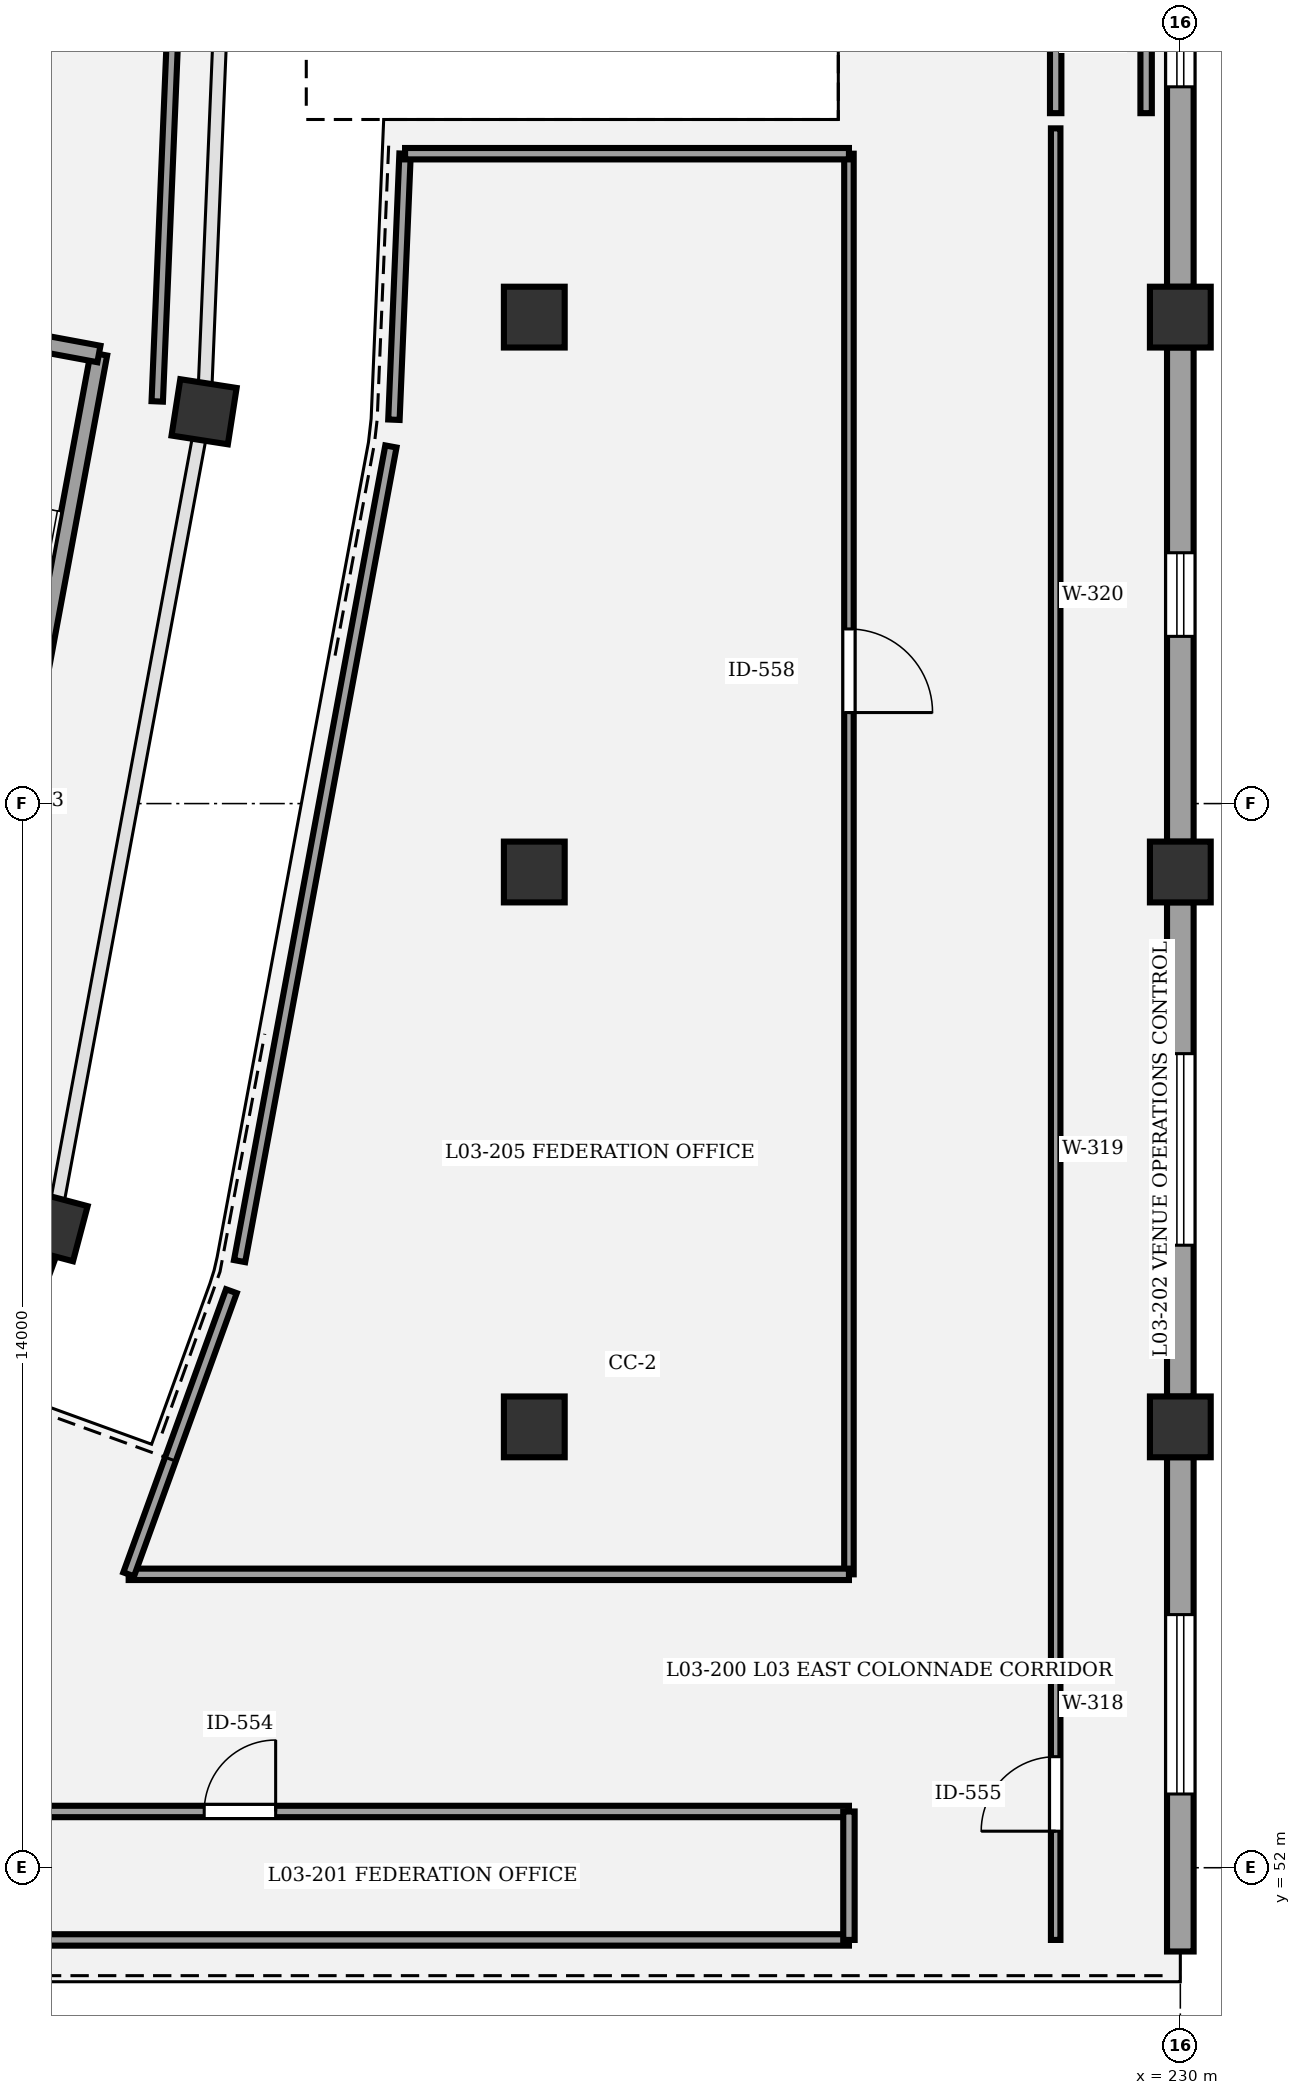
"""IFC4 building model, lengths in metres.
Left out: names, types, materials, properties, quantities, classifications, styles, units other than length and angle.
Written with IfcOpenShell. Run it as: python <this file> out.ifc"""

import sys

from ifc_helpers import new_model, si_unit, direction, frame, frame_2d, origin, origin_2d, place, context, subcontext, project, spatial, rectangle, circle, extrude, element, fill, save


model = new_model("IFC4")
c1 = context("Model", 3, precision=1e-05, world=origin(), true_north=direction((0.0, 1.0)))
c2 = subcontext(c1, "Body", "Model", "MODEL_VIEW")
j1 = project(units=[si_unit("LENGTHUNIT", "METRE"), si_unit("PLANEANGLEUNIT", "RADIAN")], contexts=[c1])
p1 = place(None, origin())
s1 = spatial("IfcSite", under=j1, at=p1, CompositionType="ELEMENT")
p2 = place(p1, origin())
s2 = spatial("IfcBuilding", under=s1, at=p2, CompositionType="ELEMENT")
p3 = place(p2, frame((0.0, 0.0, 14.7)))
s3 = spatial("IfcBuildingStorey", under=s2, at=p3, CompositionType="ELEMENT", Elevation=14.7)
for number, where, z_axis, x_axis in (
    (1, (215.165, 60.438, 0.0), (0.0, 0.0, 1.0), (0.967, -0.256, 0.0)),
    (2, (217.156, 71.155, 0.0), (0.0, 0.0, 1.0), (0.988, -0.153, 0.0)),
):
    element("IfcColumn", number, at=place(p3, frame(where, z_axis=z_axis, x_axis=x_axis)), inside=s3, PredefinedType="COLUMN", context=c2, shape_type="SweptSolid", body=[
        extrude(rectangle(XDim=0.75, YDim=0.75, at=origin_2d()), origin(), (0.0, 0.0, 1.0), 4.5),
    ])
for number, where, z_axis, x_axis in (
    (3, (221.5, 57.8, 0.0), (0.0, 0.0, 1.0), (1.0, 0.0, 0.0)),
    (4, (221.5, 65.1, 0.0), (0.0, 0.0, 1.0), (1.0, 0.0, 0.0)),
    (5, (221.5, 72.4, 0.0), (0.0, 0.0, 1.0), (1.0, 0.0, 0.0)),
    (6, (230.0, 57.8, 0.0), (0.0, 0.0, 1.0), (1.0, 0.0, 0.0)),
    (7, (230.0, 65.1, 0.0), (0.0, 0.0, 1.0), (1.0, 0.0, 0.0)),
    (8, (230.0, 72.4, 0.0), (0.0, 0.0, 1.0), (1.0, 0.0, 0.0)),
):
    element("IfcColumn", number, at=place(p3, frame(where, z_axis=z_axis, x_axis=x_axis)), inside=s3, PredefinedType="COLUMN", context=c2, shape_type="SweptSolid", body=[
        extrude(circle(Radius=0.4, at=origin_2d()), origin(), (0.0, 0.0, 1.0), 4.5),
    ])
p4 = place(p3, frame((215.037, 60.087, 0.0), z_axis=(0.0, 0.0, 1.0), x_axis=(-0.341014063491, -0.94005819421, 0.0)))
e9 = element("IfcWall", 9, at=p4, inside=s3, PredefinedType="STANDARD", context=c2, shape_type="SweptSolid", body=[
    extrude(rectangle(XDim=8.956, YDim=0.35, at=frame_2d((4.478, 0.0))), origin(), (0.0, 0.0, 1.0), 3.42),
])
p5 = place(p4, frame((3.578, 0.0, 0.0)))
e10 = element("IfcOpeningElement", 10, at=p5, cuts=e9, PredefinedType="OPENING", context=c2, shape_type="SweptSolid", body=[
    extrude(rectangle(XDim=1.8, YDim=2.4, at=frame_2d((0.9, 1.2))), frame((0.0, 0.185, 0.0), z_axis=(0.0, -1.0, 0.0), x_axis=(1.0, 0.0, 0.0)), (0.0, 0.0, 1.0), 0.37),
])
p6 = place(p3, frame((230.0, 57.402, 0.0), z_axis=(0.0, 0.0, 1.0), x_axis=(0.0, -1.0, 0.0)))
e11 = element("IfcWall", 11, at=p6, inside=s3, PredefinedType="STANDARD", context=c2, shape_type="SweptSolid", body=[
    extrude(rectangle(XDim=6.504, YDim=0.35, at=frame_2d((3.252, 0.0))), origin(), (0.0, 0.0, 1.0), 3.26),
])
p7 = place(p6, frame((2.072, 0.0, 0.9)))
e12 = element("IfcOpeningElement", 12, at=p7, cuts=e11, PredefinedType="OPENING", context=c2, shape_type="SweptSolid", body=[
    extrude(rectangle(XDim=2.36, YDim=1.55, at=frame_2d((1.18, 0.775))), frame((0.0, 0.185, 0.0), z_axis=(0.0, -1.0, 0.0), x_axis=(1.0, 0.0, 0.0)), (0.0, 0.0, 1.0), 0.37),
])
p8 = place(p3, frame((230.0, 64.702, 0.0), z_axis=(0.0, 0.0, 1.0), x_axis=(0.0, -1.0, 0.0)))
e13 = element("IfcWall", 13, at=p8, inside=s3, PredefinedType="STANDARD", context=c2, shape_type="SweptSolid", body=[
    extrude(rectangle(XDim=6.504, YDim=0.35, at=frame_2d((3.252, 0.0))), origin(), (0.0, 0.0, 1.0), 3.26),
])
p9 = place(p8, frame((1.992, 0.0, 0.9)))
e14 = element("IfcOpeningElement", 14, at=p9, cuts=e13, PredefinedType="OPENING", context=c2, shape_type="SweptSolid", body=[
    extrude(rectangle(XDim=2.52, YDim=1.55, at=frame_2d((1.26, 0.775))), frame((0.0, 0.185, 0.0), z_axis=(0.0, -1.0, 0.0), x_axis=(1.0, 0.0, 0.0)), (0.0, 0.0, 1.0), 0.37),
])
p10 = place(p3, frame((230.0, 72.002, 0.0), z_axis=(0.0, 0.0, 1.0), x_axis=(0.0, -1.0, 0.0)))
e15 = element("IfcWall", 15, at=p10, inside=s3, PredefinedType="STANDARD", context=c2, shape_type="SweptSolid", body=[
    extrude(rectangle(XDim=6.504, YDim=0.35, at=frame_2d((3.252, 0.0))), origin(), (0.0, 0.0, 1.0), 3.26),
])
p11 = place(p10, frame((2.702, 0.0, 0.9)))
e16 = element("IfcOpeningElement", 16, at=p11, cuts=e15, PredefinedType="OPENING", context=c2, shape_type="SweptSolid", body=[
    extrude(rectangle(XDim=1.1, YDim=1.75, at=frame_2d((0.55, 0.875))), frame((0.0, 0.185, 0.0), z_axis=(0.0, -1.0, 0.0), x_axis=(1.0, 0.0, 0.0)), (0.0, 0.0, 1.0), 0.37),
])
p12 = place(p3, frame((230.0, 79.302, 0.0), z_axis=(0.0, 0.0, 1.0), x_axis=(0.0, -1.0, 0.0)))
e17 = element("IfcWall", 17, at=p12, inside=s3, PredefinedType="STANDARD", context=c2, shape_type="SweptSolid", body=[
    extrude(rectangle(XDim=6.504, YDim=0.35, at=frame_2d((3.252, 0.0))), origin(), (0.0, 0.0, 1.0), 3.26),
])
p13 = place(p12, frame((2.632, 0.0, 0.9)))
e18 = element("IfcOpeningElement", 18, at=p13, cuts=e17, PredefinedType="OPENING", context=c2, shape_type="SweptSolid", body=[
    extrude(rectangle(XDim=1.24, YDim=1.75, at=frame_2d((0.62, 0.875))), frame((0.0, 0.185, 0.0), z_axis=(0.0, -1.0, 0.0), x_axis=(1.0, 0.0, 0.0)), (0.0, 0.0, 1.0), 0.37),
])
p14 = place(p3, frame((215.772, 71.915, 0.0), z_axis=(0.0, 0.0, 1.0), x_axis=(-0.182574755222, -0.983191974517, 0.0)))
e19 = element("IfcWall", 19, at=p14, inside=s3, PredefinedType="SHEAR", context=c2, shape_type="SweptSolid", body=[
    extrude(rectangle(XDim=11.02, YDim=0.22, at=frame_2d((5.51, 0.0))), origin(), (0.0, 0.0, 1.0), 4.25),
])
p15 = place(p3, frame((211.436, 72.72, 0.0), z_axis=(0.0, 0.0, 1.0), x_axis=(0.983179789985, -0.182640358532, 0.0)))
e20 = element("IfcWall", 20, at=p15, inside=s3, PredefinedType="SHEAR", context=c2, shape_type="SweptSolid", body=[
    extrude(rectangle(XDim=4.41, YDim=0.22, at=frame_2d((2.205, 0.0))), origin(), (0.0, 0.0, 1.0), 4.25),
])
p16 = place(p3, frame((215.031, 52.74, 0.0), z_axis=(0.0, 0.0, 1.0), x_axis=(1.0, 0.0, 0.0)))
e21 = element("IfcWall", 21, at=p16, inside=s3, PredefinedType="PARTITIONING", context=c2, shape_type="SweptSolid", body=[
    extrude(rectangle(XDim=10.608, YDim=0.15, at=frame_2d((5.304, 0.0))), origin(), (0.0, 0.0, 1.0), 3.25),
])
p17 = place(p16, frame((2.126, 0.0, 0.0)))
e22 = element("IfcOpeningElement", 22, at=p17, cuts=e21, PredefinedType="OPENING", context=c2, shape_type="SweptSolid", body=[
    extrude(rectangle(XDim=0.94, YDim=2.2, at=frame_2d((0.47, 1.1))), frame((0.0, 0.085, 0.0), z_axis=(0.0, -1.0, 0.0), x_axis=(1.0, 0.0, 0.0)), (0.0, 0.0, 1.0), 0.17),
])
p18 = place(p3, frame((228.36, 51.05, 0.0), z_axis=(0.0, 0.0, 1.0), x_axis=(0.0, 1.0, 0.0)))
e23 = element("IfcWall", 23, at=p18, inside=s3, PredefinedType="PARTITIONING", context=c2, shape_type="SweptSolid", body=[
    extrude(rectangle(XDim=23.833, YDim=0.125, at=frame_2d((11.917, 0.0))), origin(), (0.0, 0.0, 1.0), 3.25),
])
p19 = place(p18, frame((1.431, 0.0, 0.0)))
e24 = element("IfcOpeningElement", 24, at=p19, cuts=e23, PredefinedType="OPENING", context=c2, shape_type="SweptSolid", body=[
    extrude(rectangle(XDim=0.98, YDim=2.2, at=frame_2d((0.49, 1.1))), frame((0.0, 0.073, 0.0), z_axis=(0.0, -1.0, 0.0), x_axis=(1.0, 0.0, 0.0)), (0.0, 0.0, 1.0), 0.145),
])
p20 = place(p3, frame((228.36, 75.083, 0.0), z_axis=(0.0, 0.0, 1.0), x_axis=(0.0, 1.0, 0.0)))
e25 = element("IfcWall", 25, at=p20, inside=s3, PredefinedType="PARTITIONING", context=c2, shape_type="SweptSolid", body=[
    extrude(rectangle(XDim=23.833, YDim=0.15, at=frame_2d((11.917, 0.0))), origin(), (0.0, 0.0, 1.0), 3.25),
])
p21 = place(p20, frame((8.081, 0.0, 0.0)))
e26 = element("IfcOpeningElement", 26, at=p21, cuts=e25, PredefinedType="OPENING", context=c2, shape_type="SweptSolid", body=[
    extrude(rectangle(XDim=1.02, YDim=2.2, at=frame_2d((0.51, 1.1))), frame((0.0, 0.085, 0.0), z_axis=(0.0, -1.0, 0.0), x_axis=(1.0, 0.0, 0.0)), (0.0, 0.0, 1.0), 0.17),
])
p22 = place(p3, frame((225.64, 74.55, 0.0), z_axis=(0.0, 0.0, 1.0), x_axis=(0.0, -1.0, 0.0)))
e27 = element("IfcWall", 27, at=p22, inside=s3, PredefinedType="PARTITIONING", context=c2, shape_type="SweptSolid", body=[
    extrude(rectangle(XDim=18.69, YDim=0.125, at=frame_2d((9.345, 0.0))), origin(), (0.0, 0.0, 1.0), 3.25),
])
p23 = place(p22, frame((6.252, 0.0, 0.0)))
e28 = element("IfcOpeningElement", 28, at=p23, cuts=e27, PredefinedType="OPENING", context=c2, shape_type="SweptSolid", body=[
    extrude(rectangle(XDim=1.1, YDim=2.2, at=frame_2d((0.55, 1.1))), frame((0.0, 0.073, 0.0), z_axis=(0.0, -1.0, 0.0), x_axis=(1.0, 0.0, 0.0)), (0.0, 0.0, 1.0), 0.145),
])
p24 = place(p3, frame((217.196, 86.96, 0.0), z_axis=(0.0, 0.0, 1.0), x_axis=(-0.041907682199, -0.999121487194, 0.0)))
e29 = element("IfcWall", 29, at=p24, inside=s3, PredefinedType="PARTITIONING", context=c2, shape_type="SweptSolid", body=[
    extrude(rectangle(XDim=15.683, YDim=0.15, at=frame_2d((7.841, 0.0))), origin(), (0.0, 0.0, 1.0), 3.25),
])
p25 = place(p3, frame((225.64, 51.05, 0.0), z_axis=(0.0, 0.0, 1.0), x_axis=(-1.0, 0.0, 0.0)))
e30 = element("IfcWall", 30, at=p25, inside=s3, PredefinedType="PARTITIONING", context=c2, shape_type="SweptSolid", body=[
    extrude(rectangle(XDim=11.221, YDim=0.15, at=frame_2d((5.611, 0.0))), origin(), (0.0, 0.0, 1.0), 3.25),
])
p26 = place(p3, frame((225.64, 52.74, 0.0), z_axis=(0.0, 0.0, 1.0), x_axis=(0.0, -1.0, 0.0)))
e31 = element("IfcWall", 31, at=p26, inside=s3, PredefinedType="PARTITIONING", context=c2, shape_type="SweptSolid", body=[
    extrude(rectangle(XDim=1.69, YDim=0.15, at=frame_2d((0.845, 0.0))), origin(), (0.0, 0.0, 1.0), 3.25),
])
p27 = place(p3, frame((229.55, 98.917, 0.0), z_axis=(0.0, 0.0, 1.0), x_axis=(0.0, -1.0, 0.0)))
e32 = element("IfcWall", 32, at=p27, inside=s3, PredefinedType="PARTITIONING", context=c2, shape_type="SweptSolid", body=[
    extrude(rectangle(XDim=23.833, YDim=0.15, at=frame_2d((11.917, 0.0))), origin(), (0.0, 0.0, 1.0), 3.25),
])
p28 = place(p3, frame((217.623, 59.981, 0.0), z_axis=(0.0, 0.0, 1.0), x_axis=(0.182620957058, 0.983183393901, 0.0)))
e33 = element("IfcWall", 33, at=p28, inside=s3, PredefinedType="PARTITIONING", context=c2, shape_type="SweptSolid", body=[
    extrude(rectangle(XDim=10.901, YDim=0.15, at=frame_2d((5.45, 0.0))), origin(), (0.0, 0.0, 1.0), 3.25),
])
p29 = place(p3, frame((219.653, 71.05, 0.0), z_axis=(0.0, 0.0, 1.0), x_axis=(0.041888559174, 0.999122289117, 0.0)))
e34 = element("IfcWall", 34, at=p29, inside=s3, PredefinedType="PARTITIONING", context=c2, shape_type="SweptSolid", body=[
    extrude(rectangle(XDim=3.503, YDim=0.15, at=frame_2d((1.751, 0.0))), origin(), (0.0, 0.0, 1.0), 3.25),
])
p30 = place(p3, frame((219.8, 74.55, 0.0), z_axis=(0.0, 0.0, 1.0), x_axis=(1.0, 0.0, 0.0)))
e35 = element("IfcWall", 35, at=p30, inside=s3, PredefinedType="PARTITIONING", context=c2, shape_type="SweptSolid", body=[
    extrude(rectangle(XDim=5.84, YDim=0.15, at=frame_2d((2.92, 0.0))), origin(), (0.0, 0.0, 1.0), 3.25),
])
p31 = place(p3, frame((225.64, 55.86, 0.0), z_axis=(0.0, 0.0, 1.0), x_axis=(-1.0, 0.0, 0.0)))
e36 = element("IfcWall", 36, at=p31, inside=s3, PredefinedType="PARTITIONING", context=c2, shape_type="SweptSolid", body=[
    extrude(rectangle(XDim=9.477, YDim=0.15, at=frame_2d((4.738, 0.0))), origin(), (0.0, 0.0, 1.0), 3.25),
])
p32 = place(p3, frame((216.163, 55.86, 0.0), z_axis=(0.0, 0.0, 1.0), x_axis=(0.341035525383, 0.94005040845, 0.0)))
e37 = element("IfcWall", 37, at=p32, inside=s3, PredefinedType="PARTITIONING", context=c2, shape_type="SweptSolid", body=[
    extrude(rectangle(XDim=3.962, YDim=0.15, at=frame_2d((1.981, 0.0))), origin(), (0.0, 0.0, 1.0), 3.25),
])
p33 = place(p7, origin())
e38 = element("IfcWindow", 38, at=p33, inside=s3, PartitioningType="SINGLE_PANEL", PredefinedType="WINDOW", context=c2, shape_type="SweptSolid", body=[
    extrude(rectangle(XDim=2.36, YDim=1.55, at=frame_2d((1.18, 0.775))), frame((0.0, 0.03, 0.0), z_axis=(0.0, -1.0, 0.0), x_axis=(1.0, 0.0, 0.0)), (0.0, 0.0, 1.0), 0.06),
])
fill(e12, e38)
p34 = place(p9, origin())
e39 = element("IfcWindow", 39, at=p34, inside=s3, PartitioningType="SINGLE_PANEL", PredefinedType="WINDOW", context=c2, shape_type="SweptSolid", body=[
    extrude(rectangle(XDim=2.52, YDim=1.55, at=frame_2d((1.26, 0.775))), frame((0.0, 0.03, 0.0), z_axis=(0.0, -1.0, 0.0), x_axis=(1.0, 0.0, 0.0)), (0.0, 0.0, 1.0), 0.06),
])
fill(e14, e39)
p35 = place(p11, origin())
e40 = element("IfcWindow", 40, at=p35, inside=s3, PartitioningType="SINGLE_PANEL", PredefinedType="WINDOW", context=c2, shape_type="SweptSolid", body=[
    extrude(rectangle(XDim=1.1, YDim=1.75, at=frame_2d((0.55, 0.875))), frame((0.0, 0.03, 0.0), z_axis=(0.0, -1.0, 0.0), x_axis=(1.0, 0.0, 0.0)), (0.0, 0.0, 1.0), 0.06),
])
fill(e16, e40)
p36 = place(p13, origin())
e41 = element("IfcWindow", 41, at=p36, inside=s3, PartitioningType="SINGLE_PANEL", PredefinedType="WINDOW", context=c2, shape_type="SweptSolid", body=[
    extrude(rectangle(XDim=1.24, YDim=1.75, at=frame_2d((0.62, 0.875))), frame((0.0, 0.03, 0.0), z_axis=(0.0, -1.0, 0.0), x_axis=(1.0, 0.0, 0.0)), (0.0, 0.0, 1.0), 0.06),
])
fill(e18, e41)
p37 = place(p17, origin())
e42 = element("IfcDoor", 42, at=p37, inside=s3, OperationType="SINGLE_SWING_RIGHT", PredefinedType="DOOR", context=c2, shape_type="SweptSolid", body=[
    extrude(rectangle(XDim=0.94, YDim=2.2, at=frame_2d((0.47, 1.1))), frame((0.0, 0.025, 0.0), z_axis=(0.0, -1.0, 0.0), x_axis=(1.0, 0.0, 0.0)), (0.0, 0.0, 1.0), 0.05),
])
fill(e22, e42)
p38 = place(p19, origin())
e43 = element("IfcDoor", 43, at=p38, inside=s3, OperationType="SINGLE_SWING_LEFT", PredefinedType="DOOR", context=c2, shape_type="SweptSolid", body=[
    extrude(rectangle(XDim=0.98, YDim=2.2, at=frame_2d((0.49, 1.1))), frame((0.0, 0.025, 0.0), z_axis=(0.0, -1.0, 0.0), x_axis=(1.0, 0.0, 0.0)), (0.0, 0.0, 1.0), 0.05),
])
fill(e24, e43)
p39 = place(p23, origin())
e44 = element("IfcDoor", 44, at=p39, inside=s3, OperationType="SINGLE_SWING_RIGHT", PredefinedType="DOOR", context=c2, shape_type="SweptSolid", body=[
    extrude(rectangle(XDim=1.1, YDim=2.2, at=frame_2d((0.55, 1.1))), frame((0.0, 0.025, 0.0), z_axis=(0.0, -1.0, 0.0), x_axis=(1.0, 0.0, 0.0)), (0.0, 0.0, 1.0), 0.05),
])
fill(e28, e44)
save(model, sys.argv[1])
